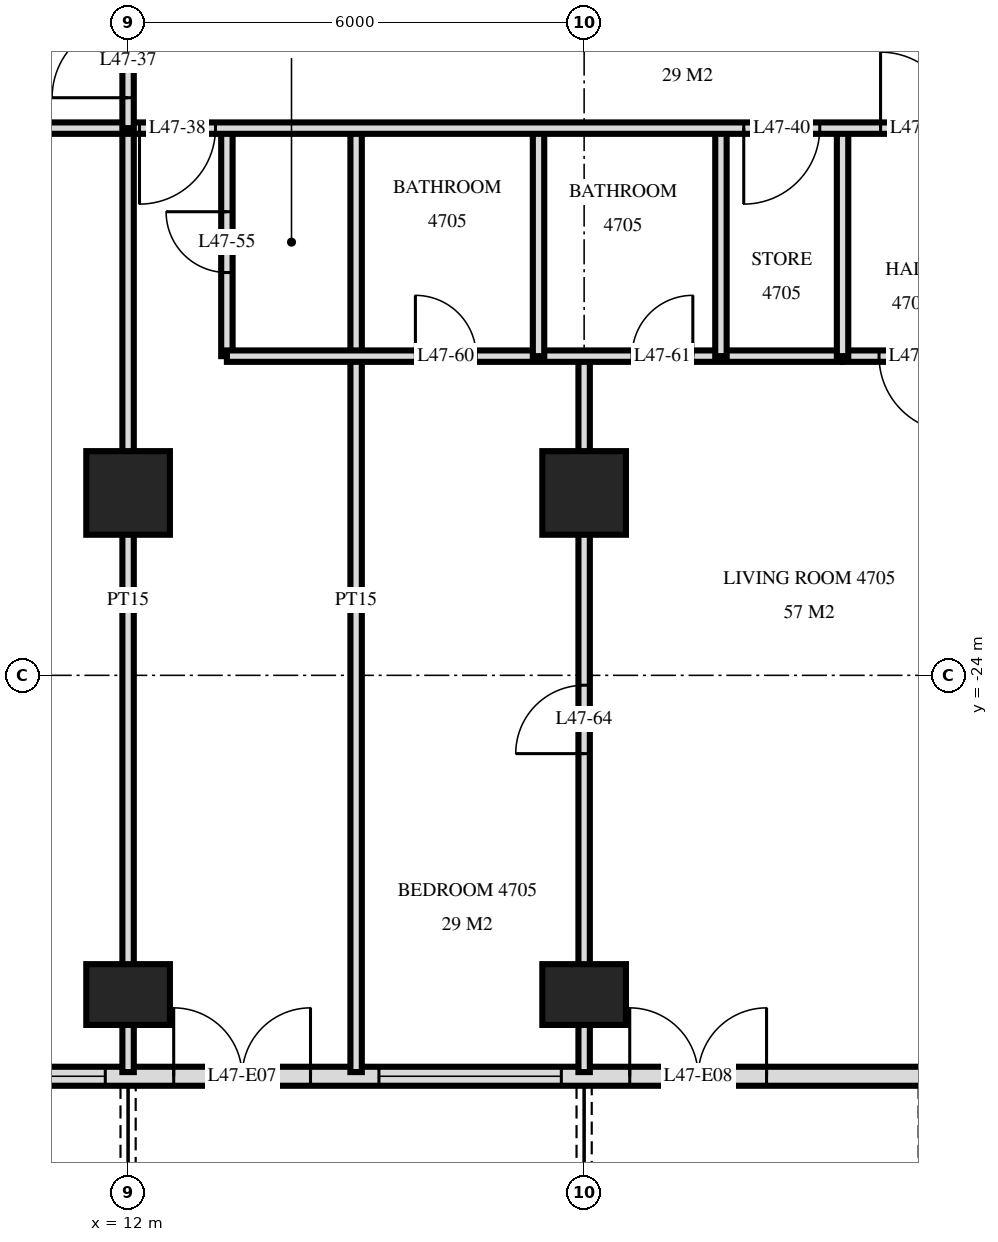
"""IFC4 building model, lengths in metres.
Left out: names, types, materials, properties, quantities, classifications, styles, units other than length and angle.
Written with IfcOpenShell. Run it as: python <this file> out.ifc"""

import sys

from ifc_helpers import new_model, si_unit, direction, frame, frame_2d, origin, origin_2d, place, context, subcontext, project, spatial, rectangle, extrude, element, fill, save


model = new_model("IFC4")
c1 = context("Model", 3, precision=1e-05, world=origin(), true_north=direction((0.0, 1.0)))
c2 = subcontext(c1, "Body", "Model", "MODEL_VIEW")
j1 = project(units=[si_unit("LENGTHUNIT", "METRE"), si_unit("PLANEANGLEUNIT", "RADIAN")], contexts=[c1])
p1 = place(None, origin())
s1 = spatial("IfcSite", under=j1, at=p1, CompositionType="ELEMENT")
p2 = place(p1, origin())
s2 = spatial("IfcBuilding", under=s1, at=p2, CompositionType="ELEMENT")
p3 = place(p2, frame((0.0, 0.0, 183.6)))
s3 = spatial("IfcBuildingStorey", under=s2, at=p3, CompositionType="ELEMENT", Elevation=183.6)
p4 = place(p3, frame((12.0, -28.2, -0.28), z_axis=(0.0, 0.0, 1.0), x_axis=(1.0, 0.0, 0.0)))
e1 = element("IfcColumn", 1, at=p4, inside=s3, PredefinedType="COLUMN", context=c2, shape_type="SweptSolid", body=[
    extrude(rectangle(XDim=1.1, YDim=0.8, at=origin_2d()), origin(), (0.0, 0.0, 1.0), 3.78),
])
p5 = place(p3, frame((12.0, -21.6, -0.28), z_axis=(0.0, 0.0, 1.0), x_axis=(1.0, 0.0, 0.0)))
e2 = element("IfcColumn", 2, at=p5, inside=s3, PredefinedType="COLUMN", context=c2, shape_type="SweptSolid", body=[
    extrude(rectangle(XDim=1.1, YDim=1.1, at=origin_2d()), origin(), (0.0, 0.0, 1.0), 3.78),
])
p6 = place(p3, frame((18.0, -28.2, -0.28), z_axis=(0.0, 0.0, 1.0), x_axis=(1.0, 0.0, 0.0)))
e3 = element("IfcColumn", 3, at=p6, inside=s3, PredefinedType="COLUMN", context=c2, shape_type="SweptSolid", body=[
    extrude(rectangle(XDim=1.1, YDim=0.8, at=origin_2d()), origin(), (0.0, 0.0, 1.0), 3.78),
])
p7 = place(p3, frame((18.0, -21.6, -0.28), z_axis=(0.0, 0.0, 1.0), x_axis=(1.0, 0.0, 0.0)))
e4 = element("IfcColumn", 4, at=p7, inside=s3, PredefinedType="COLUMN", context=c2, shape_type="SweptSolid", body=[
    extrude(rectangle(XDim=1.1, YDim=1.1, at=origin_2d()), origin(), (0.0, 0.0, 1.0), 3.78),
])
p8 = place(p3, frame((-22.475, -29.275, 0.0), z_axis=(0.0, 0.0, 1.0), x_axis=(1.0, 0.0, 0.0)))
e5 = element("IfcWall", 5, at=p8, inside=s3, PredefinedType="SOLIDWALL", context=c2, shape_type="SweptSolid", body=[
    extrude(rectangle(XDim=44.951, YDim=0.25, at=frame_2d((22.475, 0.0))), origin(), (0.0, 0.0, 1.0), 3.22),
])
p9 = place(p8, frame((0.575, 0.0, 0.0)))
e6 = element("IfcOpeningElement", 6, at=p9, cuts=e5, PredefinedType="OPENING", context=c2, shape_type="SweptSolid", body=[
    extrude(rectangle(XDim=1.8, YDim=2.4, at=frame_2d((0.9, 1.2))), frame((0.0, 0.135, 0.0), z_axis=(0.0, -1.0, 0.0), x_axis=(1.0, 0.0, 0.0)), (0.0, 0.0, 1.0), 0.27),
])
p10 = place(p8, frame((4.775, 0.0, 0.9)))
e7 = element("IfcOpeningElement", 7, at=p10, cuts=e5, PredefinedType="OPENING", context=c2, shape_type="SweptSolid", body=[
    extrude(rectangle(XDim=2.4, YDim=1.5, at=frame_2d((1.2, 0.75))), frame((0.0, 0.135, 0.0), z_axis=(0.0, -1.0, 0.0), x_axis=(1.0, 0.0, 0.0)), (0.0, 0.0, 1.0), 0.27),
])
p11 = place(p8, frame((8.075, 0.0, 0.0)))
e8 = element("IfcOpeningElement", 8, at=p11, cuts=e5, PredefinedType="OPENING", context=c2, shape_type="SweptSolid", body=[
    extrude(rectangle(XDim=1.8, YDim=2.4, at=frame_2d((0.9, 1.2))), frame((0.0, 0.135, 0.0), z_axis=(0.0, -1.0, 0.0), x_axis=(1.0, 0.0, 0.0)), (0.0, 0.0, 1.0), 0.27),
])
p12 = place(p8, frame((11.075, 0.0, 0.0)))
e9 = element("IfcOpeningElement", 9, at=p12, cuts=e5, PredefinedType="OPENING", context=c2, shape_type="SweptSolid", body=[
    extrude(rectangle(XDim=1.8, YDim=2.4, at=frame_2d((0.9, 1.2))), frame((0.0, 0.135, 0.0), z_axis=(0.0, -1.0, 0.0), x_axis=(1.0, 0.0, 0.0)), (0.0, 0.0, 1.0), 0.27),
])
p13 = place(p8, frame((13.775, 0.0, 0.9)))
e10 = element("IfcOpeningElement", 10, at=p13, cuts=e5, PredefinedType="OPENING", context=c2, shape_type="SweptSolid", body=[
    extrude(rectangle(XDim=2.4, YDim=1.5, at=frame_2d((1.2, 0.75))), frame((0.0, 0.135, 0.0), z_axis=(0.0, -1.0, 0.0), x_axis=(1.0, 0.0, 0.0)), (0.0, 0.0, 1.0), 0.27),
])
p14 = place(p8, frame((20.075, 0.0, 0.0)))
e11 = element("IfcOpeningElement", 11, at=p14, cuts=e5, PredefinedType="OPENING", context=c2, shape_type="SweptSolid", body=[
    extrude(rectangle(XDim=1.8, YDim=2.4, at=frame_2d((0.9, 1.2))), frame((0.0, 0.135, 0.0), z_axis=(0.0, -1.0, 0.0), x_axis=(1.0, 0.0, 0.0)), (0.0, 0.0, 1.0), 0.27),
])
p15 = place(p8, frame((23.075, 0.0, 0.0)))
e12 = element("IfcOpeningElement", 12, at=p15, cuts=e5, PredefinedType="OPENING", context=c2, shape_type="SweptSolid", body=[
    extrude(rectangle(XDim=1.8, YDim=2.4, at=frame_2d((0.9, 1.2))), frame((0.0, 0.135, 0.0), z_axis=(0.0, -1.0, 0.0), x_axis=(1.0, 0.0, 0.0)), (0.0, 0.0, 1.0), 0.27),
])
p16 = place(p8, frame((29.075, 0.0, 0.0)))
e13 = element("IfcOpeningElement", 13, at=p16, cuts=e5, PredefinedType="OPENING", context=c2, shape_type="SweptSolid", body=[
    extrude(rectangle(XDim=1.8, YDim=2.4, at=frame_2d((0.9, 1.2))), frame((0.0, 0.135, 0.0), z_axis=(0.0, -1.0, 0.0), x_axis=(1.0, 0.0, 0.0)), (0.0, 0.0, 1.0), 0.27),
])
p17 = place(p8, frame((31.775, 0.0, 0.9)))
e14 = element("IfcOpeningElement", 14, at=p17, cuts=e5, PredefinedType="OPENING", context=c2, shape_type="SweptSolid", body=[
    extrude(rectangle(XDim=2.4, YDim=1.5, at=frame_2d((1.2, 0.75))), frame((0.0, 0.135, 0.0), z_axis=(0.0, -1.0, 0.0), x_axis=(1.0, 0.0, 0.0)), (0.0, 0.0, 1.0), 0.27),
])
p18 = place(p8, frame((35.075, 0.0, 0.0)))
e15 = element("IfcOpeningElement", 15, at=p18, cuts=e5, PredefinedType="OPENING", context=c2, shape_type="SweptSolid", body=[
    extrude(rectangle(XDim=1.8, YDim=2.4, at=frame_2d((0.9, 1.2))), frame((0.0, 0.135, 0.0), z_axis=(0.0, -1.0, 0.0), x_axis=(1.0, 0.0, 0.0)), (0.0, 0.0, 1.0), 0.27),
])
p19 = place(p8, frame((37.775, 0.0, 0.9)))
e16 = element("IfcOpeningElement", 16, at=p19, cuts=e5, PredefinedType="OPENING", context=c2, shape_type="SweptSolid", body=[
    extrude(rectangle(XDim=2.4, YDim=1.5, at=frame_2d((1.2, 0.75))), frame((0.0, 0.135, 0.0), z_axis=(0.0, -1.0, 0.0), x_axis=(1.0, 0.0, 0.0)), (0.0, 0.0, 1.0), 0.27),
])
p20 = place(p8, frame((41.075, 0.0, 0.0)))
e17 = element("IfcOpeningElement", 17, at=p20, cuts=e5, PredefinedType="OPENING", context=c2, shape_type="SweptSolid", body=[
    extrude(rectangle(XDim=1.8, YDim=2.4, at=frame_2d((0.9, 1.2))), frame((0.0, 0.135, 0.0), z_axis=(0.0, -1.0, 0.0), x_axis=(1.0, 0.0, 0.0)), (0.0, 0.0, 1.0), 0.27),
])
for number, where, z_axis, x_axis in (
    (18, (21.4, -19.8, 0.0), (0.0, 0.0, 1.0), (0.0, 1.0, 0.0)),
    (19, (19.8, -19.8, 0.0), (0.0, 0.0, 1.0), (0.0, 1.0, 0.0)),
):
    element("IfcWall", number, at=place(p3, frame(where, z_axis=z_axis, x_axis=x_axis)), inside=s3, PredefinedType="PARTITIONING", context=c2, shape_type="SweptSolid", body=[
        extrude(rectangle(XDim=3.0, YDim=0.15, at=frame_2d((1.5, 0.0))), origin(), (0.0, 0.0, 1.0), 3.22),
    ])
p21 = place(p3, frame((18.0, -29.22, 0.0), z_axis=(0.0, 0.0, 1.0), x_axis=(0.0, 1.0, 0.0)))
e20 = element("IfcWall", 20, at=p21, inside=s3, PredefinedType="PARTITIONING", context=c2, shape_type="SweptSolid", body=[
    extrude(rectangle(XDim=9.42, YDim=0.15, at=frame_2d((4.71, 0.0))), origin(), (0.0, 0.0, 1.0), 3.22),
])
p22 = place(p21, frame((4.19, 0.0, 0.0)))
e21 = element("IfcOpeningElement", 21, at=p22, cuts=e20, PredefinedType="OPENING", context=c2, shape_type="SweptSolid", body=[
    extrude(rectangle(XDim=0.9, YDim=2.1, at=frame_2d((0.45, 1.05))), frame((0.0, 0.085, 0.0), z_axis=(0.0, -1.0, 0.0), x_axis=(1.0, 0.0, 0.0)), (0.0, 0.0, 1.0), 0.17),
])
p23 = place(p3, frame((17.4, -19.8, 0.0), z_axis=(0.0, 0.0, 1.0), x_axis=(0.0, 1.0, 0.0)))
e22 = element("IfcWall", 22, at=p23, inside=s3, PredefinedType="PARTITIONING", context=c2, shape_type="SweptSolid", body=[
    extrude(rectangle(XDim=3.0, YDim=0.15, at=frame_2d((1.5, 0.0))), origin(), (0.0, 0.0, 1.0), 3.22),
])
p24 = place(p3, frame((15.0, -29.22, 0.0), z_axis=(0.0, 0.0, 1.0), x_axis=(0.0, 1.0, 0.0)))
e23 = element("IfcWall", 23, at=p24, inside=s3, PredefinedType="PARTITIONING", context=c2, shape_type="SweptSolid", body=[
    extrude(rectangle(XDim=12.42, YDim=0.15, at=frame_2d((6.21, 0.0))), origin(), (0.0, 0.0, 1.0), 3.22),
])
p25 = place(p3, frame((13.3, -19.8, 0.0), z_axis=(0.0, 0.0, 1.0), x_axis=(0.0, 1.0, 0.0)))
e24 = element("IfcWall", 24, at=p25, inside=s3, PredefinedType="PARTITIONING", context=c2, shape_type="SweptSolid", body=[
    extrude(rectangle(XDim=3.0, YDim=0.15, at=frame_2d((1.5, 0.0))), origin(), (0.0, 0.0, 1.0), 3.22),
])
p26 = place(p25, frame((1.1, 0.0, 0.0)))
e25 = element("IfcOpeningElement", 25, at=p26, cuts=e24, PredefinedType="OPENING", context=c2, shape_type="SweptSolid", body=[
    extrude(rectangle(XDim=0.8, YDim=2.1, at=frame_2d((0.4, 1.05))), frame((0.0, 0.085, 0.0), z_axis=(0.0, -1.0, 0.0), x_axis=(1.0, 0.0, 0.0)), (0.0, 0.0, 1.0), 0.17),
])
p27 = place(p3, frame((12.0, -16.8, 0.0), z_axis=(0.0, 0.0, 1.0), x_axis=(0.0, 1.0, 0.0)))
e26 = element("IfcWall", 26, at=p27, inside=s3, PredefinedType="PARTITIONING", context=c2, shape_type="SweptSolid", body=[
    extrude(rectangle(XDim=1.75, YDim=0.15, at=frame_2d((0.875, 0.0))), origin(), (0.0, 0.0, 1.0), 3.22),
])
p28 = place(p27, frame((0.4, 0.0, 0.0)))
e27 = element("IfcOpeningElement", 27, at=p28, cuts=e26, PredefinedType="OPENING", context=c2, shape_type="SweptSolid", body=[
    extrude(rectangle(XDim=1.0, YDim=2.1, at=frame_2d((0.5, 1.05))), frame((0.0, 0.085, 0.0), z_axis=(0.0, -1.0, 0.0), x_axis=(1.0, 0.0, 0.0)), (0.0, 0.0, 1.0), 0.17),
])
p29 = place(p3, frame((12.0, -29.22, 0.0), z_axis=(0.0, 0.0, 1.0), x_axis=(0.0, 1.0, 0.0)))
e28 = element("IfcWall", 28, at=p29, inside=s3, PredefinedType="PARTITIONING", context=c2, shape_type="SweptSolid", body=[
    extrude(rectangle(XDim=12.42, YDim=0.15, at=frame_2d((6.21, 0.0))), origin(), (0.0, 0.0, 1.0), 3.22),
])
p30 = place(p3, frame((21.4, -19.8, 0.0), z_axis=(0.0, 0.0, 1.0), x_axis=(1.0, 0.0, 0.0)))
e29 = element("IfcWall", 29, at=p30, inside=s3, PredefinedType="PARTITIONING", context=c2, shape_type="SweptSolid", body=[
    extrude(rectangle(XDim=2.0, YDim=0.15, at=frame_2d((1.0, 0.0))), origin(), (0.0, 0.0, 1.0), 3.22),
])
p31 = place(p30, frame((0.48, 0.0, 0.0)))
e30 = element("IfcOpeningElement", 30, at=p31, cuts=e29, PredefinedType="OPENING", context=c2, shape_type="SweptSolid", body=[
    extrude(rectangle(XDim=1.0, YDim=2.1, at=frame_2d((0.5, 1.05))), frame((0.0, 0.085, 0.0), z_axis=(0.0, -1.0, 0.0), x_axis=(1.0, 0.0, 0.0)), (0.0, 0.0, 1.0), 0.17),
])
p32 = place(p3, frame((13.3, -19.8, 0.0), z_axis=(0.0, 0.0, 1.0), x_axis=(1.0, 0.0, 0.0)))
e31 = element("IfcWall", 31, at=p32, inside=s3, PredefinedType="PARTITIONING", context=c2, shape_type="SweptSolid", body=[
    extrude(rectangle(XDim=8.1, YDim=0.15, at=frame_2d((4.05, 0.0))), origin(), (0.0, 0.0, 1.0), 3.22),
])
p33 = place(p32, frame((2.48, 0.0, 0.0)))
e32 = element("IfcOpeningElement", 32, at=p33, cuts=e31, PredefinedType="OPENING", context=c2, shape_type="SweptSolid", body=[
    extrude(rectangle(XDim=0.8, YDim=2.1, at=frame_2d((0.4, 1.05))), frame((0.0, 0.085, 0.0), z_axis=(0.0, -1.0, 0.0), x_axis=(1.0, 0.0, 0.0)), (0.0, 0.0, 1.0), 0.17),
])
p34 = place(p32, frame((5.33, 0.0, 0.0)))
e33 = element("IfcOpeningElement", 33, at=p34, cuts=e31, PredefinedType="OPENING", context=c2, shape_type="SweptSolid", body=[
    extrude(rectangle(XDim=0.8, YDim=2.1, at=frame_2d((0.4, 1.05))), frame((0.0, 0.085, 0.0), z_axis=(0.0, -1.0, 0.0), x_axis=(1.0, 0.0, 0.0)), (0.0, 0.0, 1.0), 0.17),
])
p35 = place(p3, frame((-26.82, -16.8, 0.0), z_axis=(0.0, 0.0, 1.0), x_axis=(1.0, 0.0, 0.0)))
e34 = element("IfcWall", 34, at=p35, inside=s3, PredefinedType="PARTITIONING", context=c2, shape_type="SweptSolid", body=[
    extrude(rectangle(XDim=53.64, YDim=0.15, at=frame_2d((26.82, 0.0))), origin(), (0.0, 0.0, 1.0), 3.22),
])
p36 = place(p35, frame((11.97, 0.0, 0.0)))
e35 = element("IfcOpeningElement", 35, at=p36, cuts=e34, PredefinedType="OPENING", context=c2, shape_type="SweptSolid", body=[
    extrude(rectangle(XDim=1.0, YDim=2.1, at=frame_2d((0.5, 1.05))), frame((0.0, 0.085, 0.0), z_axis=(0.0, -1.0, 0.0), x_axis=(1.0, 0.0, 0.0)), (0.0, 0.0, 1.0), 0.17),
])
p37 = place(p35, frame((10.67, 0.0, 0.0)))
e36 = element("IfcOpeningElement", 36, at=p37, cuts=e34, PredefinedType="OPENING", context=c2, shape_type="SweptSolid", body=[
    extrude(rectangle(XDim=1.0, YDim=2.1, at=frame_2d((0.5, 1.05))), frame((0.0, 0.085, 0.0), z_axis=(0.0, -1.0, 0.0), x_axis=(1.0, 0.0, 0.0)), (0.0, 0.0, 1.0), 0.17),
])
p38 = place(p35, frame((3.22, 0.0, 0.0)))
e37 = element("IfcOpeningElement", 37, at=p38, cuts=e34, PredefinedType="OPENING", context=c2, shape_type="SweptSolid", body=[
    extrude(rectangle(XDim=1.0, YDim=2.1, at=frame_2d((0.5, 1.05))), frame((0.0, 0.085, 0.0), z_axis=(0.0, -1.0, 0.0), x_axis=(1.0, 0.0, 0.0)), (0.0, 0.0, 1.0), 0.17),
])
p39 = place(p35, frame((5.02, 0.0, 0.0)))
e38 = element("IfcOpeningElement", 38, at=p39, cuts=e34, PredefinedType="OPENING", context=c2, shape_type="SweptSolid", body=[
    extrude(rectangle(XDim=1.0, YDim=2.1, at=frame_2d((0.5, 1.05))), frame((0.0, 0.085, 0.0), z_axis=(0.0, -1.0, 0.0), x_axis=(1.0, 0.0, 0.0)), (0.0, 0.0, 1.0), 0.17),
])
p40 = place(p35, frame((38.97, 0.0, 0.0)))
e39 = element("IfcOpeningElement", 39, at=p40, cuts=e34, PredefinedType="OPENING", context=c2, shape_type="SweptSolid", body=[
    extrude(rectangle(XDim=1.0, YDim=2.1, at=frame_2d((0.5, 1.05))), frame((0.0, 0.085, 0.0), z_axis=(0.0, -1.0, 0.0), x_axis=(1.0, 0.0, 0.0)), (0.0, 0.0, 1.0), 0.17),
])
p41 = place(p35, frame((48.72, 0.0, 0.0)))
e40 = element("IfcOpeningElement", 40, at=p41, cuts=e34, PredefinedType="OPENING", context=c2, shape_type="SweptSolid", body=[
    extrude(rectangle(XDim=1.0, YDim=2.1, at=frame_2d((0.5, 1.05))), frame((0.0, 0.085, 0.0), z_axis=(0.0, -1.0, 0.0), x_axis=(1.0, 0.0, 0.0)), (0.0, 0.0, 1.0), 0.17),
])
p42 = place(p35, frame((46.92, 0.0, 0.0)))
e41 = element("IfcOpeningElement", 41, at=p42, cuts=e34, PredefinedType="OPENING", context=c2, shape_type="SweptSolid", body=[
    extrude(rectangle(XDim=1.0, YDim=2.1, at=frame_2d((0.5, 1.05))), frame((0.0, 0.085, 0.0), z_axis=(0.0, -1.0, 0.0), x_axis=(1.0, 0.0, 0.0)), (0.0, 0.0, 1.0), 0.17),
])
p43 = place(p35, frame((18.32, 0.0, 0.0)))
e42 = element("IfcOpeningElement", 42, at=p43, cuts=e34, PredefinedType="OPENING", context=c2, shape_type="SweptSolid", body=[
    extrude(rectangle(XDim=1.0, YDim=2.1, at=frame_2d((0.5, 1.05))), frame((0.0, 0.085, 0.0), z_axis=(0.0, -1.0, 0.0), x_axis=(1.0, 0.0, 0.0)), (0.0, 0.0, 1.0), 0.17),
])
p44 = place(p35, frame((26.32, 0.0, 0.0)))
e43 = element("IfcOpeningElement", 43, at=p44, cuts=e34, PredefinedType="OPENING", context=c2, shape_type="SweptSolid", body=[
    extrude(rectangle(XDim=1.0, YDim=2.1, at=frame_2d((0.5, 1.05))), frame((0.0, 0.085, 0.0), z_axis=(0.0, -1.0, 0.0), x_axis=(1.0, 0.0, 0.0)), (0.0, 0.0, 1.0), 0.17),
])
p45 = place(p35, frame((34.32, 0.0, 0.0)))
e44 = element("IfcOpeningElement", 44, at=p45, cuts=e34, PredefinedType="OPENING", context=c2, shape_type="SweptSolid", body=[
    extrude(rectangle(XDim=1.0, YDim=2.1, at=frame_2d((0.5, 1.05))), frame((0.0, 0.085, 0.0), z_axis=(0.0, -1.0, 0.0), x_axis=(1.0, 0.0, 0.0)), (0.0, 0.0, 1.0), 0.17),
])
p46 = place(p17, origin())
e45 = element("IfcWindow", 45, at=p46, inside=s3, PartitioningType="SINGLE_PANEL", PredefinedType="WINDOW", context=c2, shape_type="SweptSolid", body=[
    extrude(rectangle(XDim=2.4, YDim=1.5, at=frame_2d((1.2, 0.75))), frame((0.0, 0.03, 0.0), z_axis=(0.0, -1.0, 0.0), x_axis=(1.0, 0.0, 0.0)), (0.0, 0.0, 1.0), 0.06),
])
fill(e14, e45)
p47 = place(p18, origin())
e46 = element("IfcDoor", 46, at=p47, inside=s3, OperationType="DOUBLE_DOOR_SINGLE_SWING", PredefinedType="DOOR", context=c2, shape_type="SweptSolid", body=[
    extrude(rectangle(XDim=1.8, YDim=2.4, at=frame_2d((0.9, 1.2))), frame((0.0, 0.025, 0.0), z_axis=(0.0, -1.0, 0.0), x_axis=(1.0, 0.0, 0.0)), (0.0, 0.0, 1.0), 0.05),
])
fill(e15, e46)
p48 = place(p19, origin())
e47 = element("IfcWindow", 47, at=p48, inside=s3, PartitioningType="SINGLE_PANEL", PredefinedType="WINDOW", context=c2, shape_type="SweptSolid", body=[
    extrude(rectangle(XDim=2.4, YDim=1.5, at=frame_2d((1.2, 0.75))), frame((0.0, 0.03, 0.0), z_axis=(0.0, -1.0, 0.0), x_axis=(1.0, 0.0, 0.0)), (0.0, 0.0, 1.0), 0.06),
])
fill(e16, e47)
p49 = place(p20, origin())
e48 = element("IfcDoor", 48, at=p49, inside=s3, OperationType="DOUBLE_DOOR_SINGLE_SWING", PredefinedType="DOOR", context=c2, shape_type="SweptSolid", body=[
    extrude(rectangle(XDim=1.8, YDim=2.4, at=frame_2d((0.9, 1.2))), frame((0.0, 0.025, 0.0), z_axis=(0.0, -1.0, 0.0), x_axis=(1.0, 0.0, 0.0)), (0.0, 0.0, 1.0), 0.05),
])
fill(e17, e48)
p50 = place(p28, origin())
e49 = element("IfcDoor", 49, at=p50, inside=s3, OperationType="SINGLE_SWING_RIGHT", PredefinedType="DOOR", context=c2, shape_type="SweptSolid", body=[
    extrude(rectangle(XDim=1.0, YDim=2.1, at=frame_2d((0.5, 1.05))), frame((0.0, 0.025, 0.0), z_axis=(0.0, -1.0, 0.0), x_axis=(1.0, 0.0, 0.0)), (0.0, 0.0, 1.0), 0.05),
])
fill(e27, e49)
p51 = place(p40, frame((0.5, 0.0, 0.0), z_axis=(0.0, 0.0, 1.0), x_axis=(-1.0, 0.0, 0.0)))
e50 = element("IfcDoor", 50, at=p51, inside=s3, OperationType="SINGLE_SWING_LEFT", PredefinedType="DOOR", context=c2, shape_type="SweptSolid", body=[
    extrude(rectangle(XDim=1.0, YDim=2.1, at=frame_2d((0.0, 1.05))), frame((0.0, -0.025, 0.0), z_axis=(0.0, 1.0, 0.0), x_axis=(-1.0, 0.0, 0.0)), (0.0, 0.0, 1.0), 0.05),
])
fill(e39, e50)
p52 = place(p41, origin())
e51 = element("IfcDoor", 51, at=p52, inside=s3, OperationType="SINGLE_SWING_RIGHT", PredefinedType="DOOR", context=c2, shape_type="SweptSolid", body=[
    extrude(rectangle(XDim=1.0, YDim=2.1, at=frame_2d((0.5, 1.05))), frame((0.0, 0.025, 0.0), z_axis=(0.0, -1.0, 0.0), x_axis=(1.0, 0.0, 0.0)), (0.0, 0.0, 1.0), 0.05),
])
fill(e40, e51)
p53 = place(p42, frame((0.5, 0.0, 0.0), z_axis=(0.0, 0.0, 1.0), x_axis=(-1.0, 0.0, 0.0)))
e52 = element("IfcDoor", 52, at=p53, inside=s3, OperationType="SINGLE_SWING_LEFT", PredefinedType="DOOR", context=c2, shape_type="SweptSolid", body=[
    extrude(rectangle(XDim=1.0, YDim=2.1, at=frame_2d((0.0, 1.05))), frame((0.0, -0.025, 0.0), z_axis=(0.0, 1.0, 0.0), x_axis=(-1.0, 0.0, 0.0)), (0.0, 0.0, 1.0), 0.05),
])
fill(e41, e52)
p54 = place(p26, origin())
e53 = element("IfcDoor", 53, at=p54, inside=s3, OperationType="SINGLE_SWING_LEFT", PredefinedType="DOOR", context=c2, shape_type="SweptSolid", body=[
    extrude(rectangle(XDim=0.8, YDim=2.1, at=frame_2d((0.4, 1.05))), frame((0.0, 0.025, 0.0), z_axis=(0.0, -1.0, 0.0), x_axis=(1.0, 0.0, 0.0)), (0.0, 0.0, 1.0), 0.05),
])
fill(e25, e53)
p55 = place(p33, origin())
e54 = element("IfcDoor", 54, at=p55, inside=s3, OperationType="SINGLE_SWING_RIGHT", PredefinedType="DOOR", context=c2, shape_type="SweptSolid", body=[
    extrude(rectangle(XDim=0.8, YDim=2.1, at=frame_2d((0.4, 1.05))), frame((0.0, 0.025, 0.0), z_axis=(0.0, -1.0, 0.0), x_axis=(1.0, 0.0, 0.0)), (0.0, 0.0, 1.0), 0.05),
])
fill(e32, e54)
p56 = place(p34, origin())
e55 = element("IfcDoor", 55, at=p56, inside=s3, OperationType="SINGLE_SWING_LEFT", PredefinedType="DOOR", context=c2, shape_type="SweptSolid", body=[
    extrude(rectangle(XDim=0.8, YDim=2.1, at=frame_2d((0.4, 1.05))), frame((0.0, 0.025, 0.0), z_axis=(0.0, -1.0, 0.0), x_axis=(1.0, 0.0, 0.0)), (0.0, 0.0, 1.0), 0.05),
])
fill(e33, e55)
p57 = place(p31, frame((0.5, 0.0, 0.0), z_axis=(0.0, 0.0, 1.0), x_axis=(-1.0, 0.0, 0.0)))
e56 = element("IfcDoor", 56, at=p57, inside=s3, OperationType="SINGLE_SWING_RIGHT", PredefinedType="DOOR", context=c2, shape_type="SweptSolid", body=[
    extrude(rectangle(XDim=1.0, YDim=2.1, at=frame_2d((0.0, 1.05))), frame((0.0, -0.025, 0.0), z_axis=(0.0, 1.0, 0.0), x_axis=(-1.0, 0.0, 0.0)), (0.0, 0.0, 1.0), 0.05),
])
fill(e30, e56)
p58 = place(p22, origin())
e57 = element("IfcDoor", 57, at=p58, inside=s3, OperationType="SINGLE_SWING_RIGHT", PredefinedType="DOOR", context=c2, shape_type="SweptSolid", body=[
    extrude(rectangle(XDim=0.9, YDim=2.1, at=frame_2d((0.45, 1.05))), frame((0.0, 0.025, 0.0), z_axis=(0.0, -1.0, 0.0), x_axis=(1.0, 0.0, 0.0)), (0.0, 0.0, 1.0), 0.05),
])
fill(e21, e57)
save(model, sys.argv[1])
